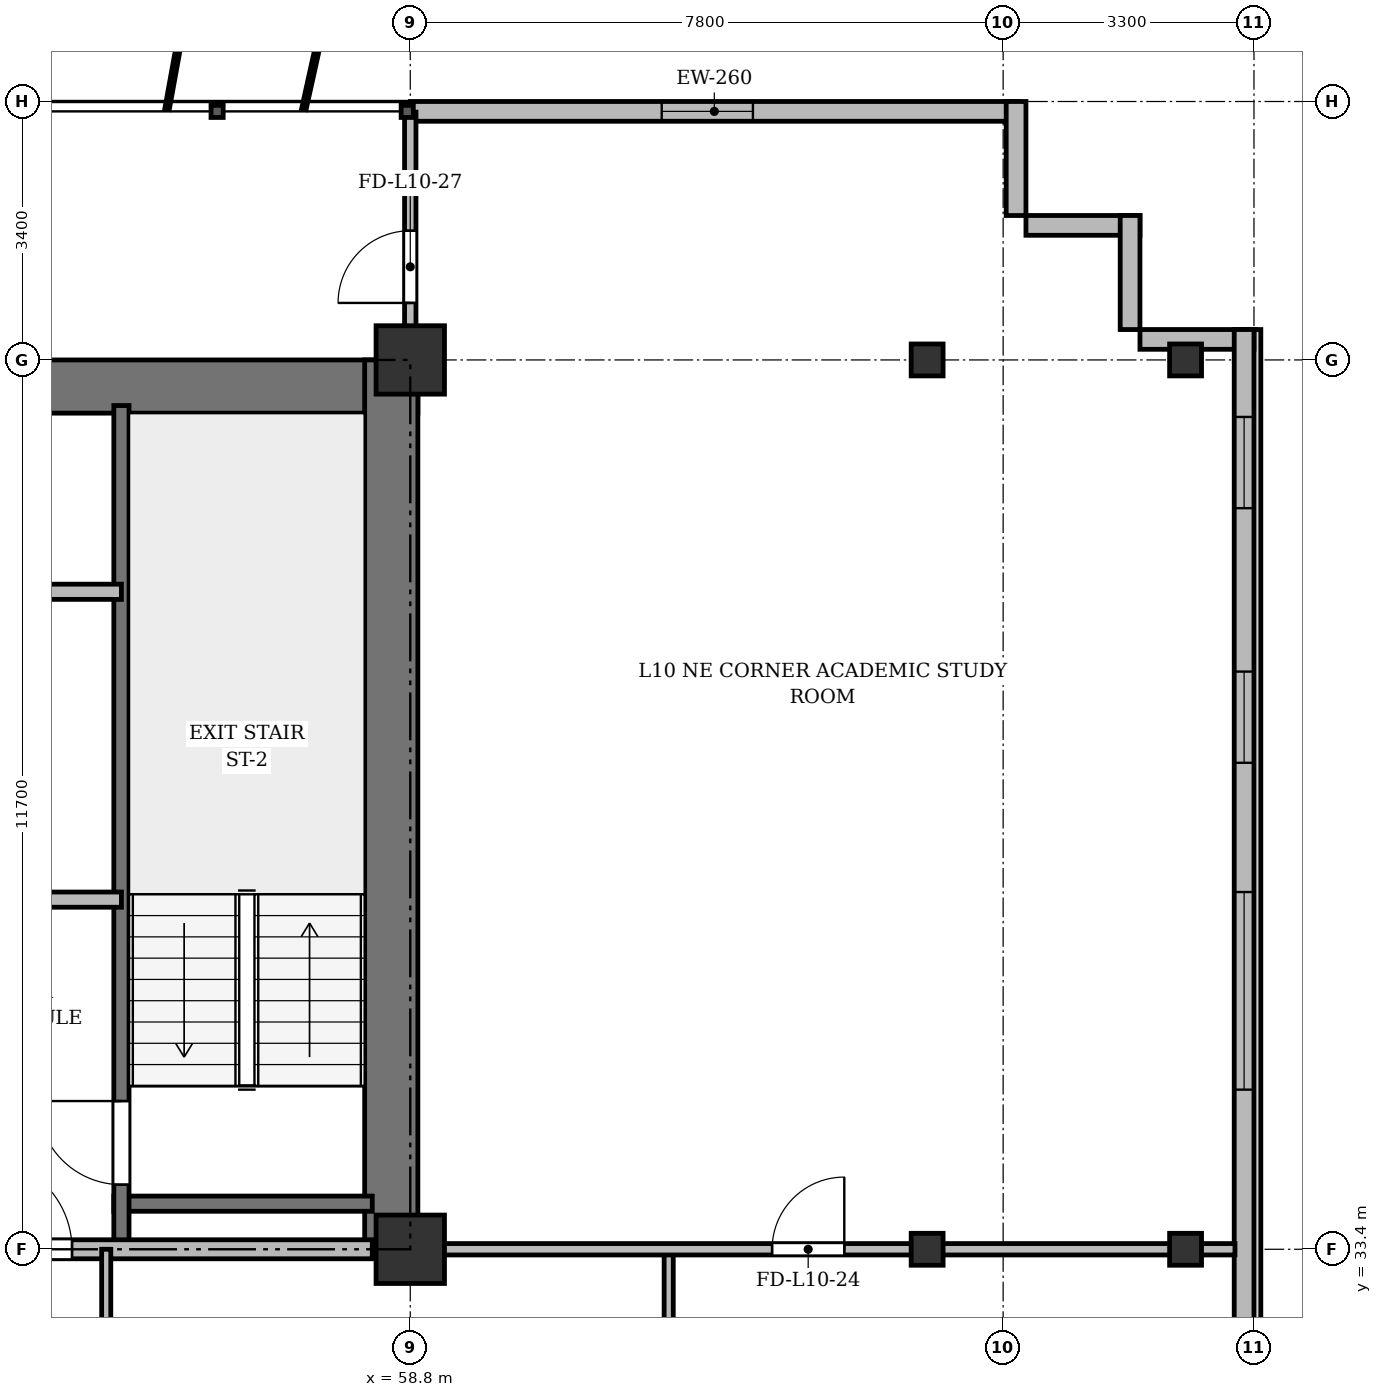
"""IFC4 building model, lengths in metres.
Left out: names, types, materials, properties, quantities, classifications, styles, units other than length and angle.
Written with IfcOpenShell. Run it as: python <this file> out.ifc"""

import sys

from ifc_helpers import new_model, si_unit, direction, frame, frame_2d, origin, origin_2d, place, context, subcontext, project, spatial, rectangle, i_section, extrude, source, transform, mapped, element, fill, save


model = new_model("IFC4")
c1 = context("Model", 3, precision=1e-05, world=origin(), true_north=direction((0.0, 1.0)))
c2 = subcontext(c1, "Body", "Model", "MODEL_VIEW")
j1 = project(units=[si_unit("LENGTHUNIT", "METRE"), si_unit("PLANEANGLEUNIT", "RADIAN")], contexts=[c1])
p1 = place(None, origin())
s1 = spatial("IfcSite", under=j1, at=p1, CompositionType="ELEMENT")
p2 = place(p1, origin())
s2 = spatial("IfcBuilding", under=s1, at=p2, CompositionType="ELEMENT")
p3 = place(p2, frame((0.0, 0.0, 41.5)))
s3 = spatial("IfcBuildingStorey", under=s2, at=p3, CompositionType="ELEMENT", Elevation=41.5)
m1 = source(origin(), c2, "Body", "SweptSolid", [
    extrude(rectangle(XDim=0.9, YDim=0.9, at=origin_2d()), origin(), (0.0, 0.0, 1.0), 3.6),
])
for number, where, z_axis, x_axis in (
    (1, (58.8, 33.4, 0.0), (0.0, 0.0, 1.0), (1.0, 0.0, 0.0)),
    (2, (58.8, 45.1, 0.0), (0.0, 0.0, 1.0), (1.0, 0.0, 0.0)),
):
    element("IfcColumn", number, at=place(p3, frame(where, z_axis=z_axis, x_axis=x_axis)), inside=s3, PredefinedType="COLUMN", context=c2, shape_type="MappedRepresentation", body=[
        mapped(m1, transform((0.0, 0.0, 0.0), x_axis=(1.0, 0.0, 0.0), y_axis=(0.0, 1.0, 0.0), z_axis=(0.0, 0.0, 1.0), scale=1.0)),
    ])
m2 = source(origin(), c2, "Body", "SweptSolid", [
    extrude(i_section(OverallWidth=0.42, OverallDepth=0.42, WebThickness=0.026, FlangeThickness=0.04, at=origin_2d()), origin(), (0.0, 0.0, 1.0), 3.6),
])
for number, where, z_axis, x_axis in (
    (3, (65.6, 33.4, 0.0), (0.0, 0.0, 1.0), (1.0, 0.0, 0.0)),
    (4, (65.6, 45.1, 0.0), (0.0, 0.0, 1.0), (1.0, 0.0, 0.0)),
    (5, (69.0, 33.4, 0.0), (0.0, 0.0, 1.0), (1.0, 0.0, 0.0)),
    (6, (69.0, 45.1, 0.0), (0.0, 0.0, 1.0), (1.0, 0.0, 0.0)),
):
    element("IfcColumn", number, at=place(p3, frame(where, z_axis=z_axis, x_axis=x_axis)), inside=s3, PredefinedType="COLUMN", context=c2, shape_type="MappedRepresentation", body=[
        mapped(m2, transform((0.0, 0.0, 0.0), x_axis=(1.0, 0.0, 0.0), y_axis=(0.0, 1.0, 0.0), z_axis=(0.0, 0.0, 1.0), scale=1.0)),
    ])
p4 = place(p3, frame((58.8, 48.37, 0.0), z_axis=(0.0, 0.0, 1.0), x_axis=(1.0, 0.0, 0.0)))
e7 = element("IfcWall", 7, at=p4, inside=s3, PredefinedType="SOLIDWALL", context=c2, shape_type="SweptSolid", body=[
    extrude(rectangle(XDim=8.0, YDim=0.26, at=frame_2d((4.0, 0.0))), origin(), (0.0, 0.0, 1.0), 3.34),
])
p5 = place(p4, frame((3.308, 0.0, 0.9)))
e8 = element("IfcOpeningElement", 8, at=p5, cuts=e7, PredefinedType="OPENING", context=c2, shape_type="SweptSolid", body=[
    extrude(rectangle(XDim=1.2, YDim=1.65, at=frame_2d((0.6, 0.825))), frame((0.0, 0.14, 0.0), z_axis=(0.0, -1.0, 0.0), x_axis=(1.0, 0.0, 0.0)), (0.0, 0.0, 1.0), 0.28),
])
for number, where, z_axis, x_axis in (
    (9, (66.77, 48.5, 0.0), (0.0, 0.0, 1.0), (0.0, -1.0, 0.0)),
    (10, (66.9, 46.87, 0.0), (0.0, 0.0, 1.0), (1.0, 0.0, 0.0)),
    (11, (68.27, 47.0, 0.0), (0.0, 0.0, 1.0), (0.0, -1.0, 0.0)),
):
    element("IfcWall", number, at=place(p3, frame(where, z_axis=z_axis, x_axis=x_axis)), inside=s3, PredefinedType="SOLIDWALL", context=c2, shape_type="SweptSolid", body=[
        extrude(rectangle(XDim=1.5, YDim=0.26, at=frame_2d((0.75, 0.0))), origin(), (0.0, 0.0, 1.0), 3.34),
    ])
p6 = place(p3, frame((68.4, 45.37, 0.0), z_axis=(0.0, 0.0, 1.0), x_axis=(1.0, 0.0, 0.0)))
e12 = element("IfcWall", 12, at=p6, inside=s3, PredefinedType="SOLIDWALL", context=c2, shape_type="SweptSolid", body=[
    extrude(rectangle(XDim=1.5, YDim=0.26, at=frame_2d((0.75, 0.0))), origin(), (0.0, 0.0, 1.0), 2.69),
])
p7 = place(p3, frame((69.77, 45.5, 0.0), z_axis=(0.0, 0.0, 1.0), x_axis=(0.0, -1.0, 0.0)))
e13 = element("IfcWall", 13, at=p7, inside=s3, PredefinedType="SOLIDWALL", context=c2, shape_type="SweptSolid", body=[
    extrude(rectangle(XDim=39.6, YDim=0.26, at=frame_2d((19.8, 0.0))), origin(), (0.0, 0.0, 1.0), 3.34),
])
p8 = place(p7, frame((36.95, 0.0, 0.92)))
e14 = element("IfcOpeningElement", 14, at=p8, cuts=e13, PredefinedType="OPENING", context=c2, shape_type="SweptSolid", body=[
    extrude(rectangle(XDim=1.2, YDim=1.65, at=frame_2d((0.6, 0.825))), frame((0.0, 0.14, 0.0), z_axis=(0.0, -1.0, 0.0), x_axis=(1.0, 0.0, 0.0)), (0.0, 0.0, 1.0), 0.28),
])
p9 = place(p7, frame((32.8, 0.0, 0.92)))
e15 = element("IfcOpeningElement", 15, at=p9, cuts=e13, PredefinedType="OPENING", context=c2, shape_type="SweptSolid", body=[
    extrude(rectangle(XDim=2.6, YDim=1.9, at=frame_2d((1.3, 0.95))), frame((0.0, 0.14, 0.0), z_axis=(0.0, -1.0, 0.0), x_axis=(1.0, 0.0, 0.0)), (0.0, 0.0, 1.0), 0.28),
])
p10 = place(p7, frame((28.6, 0.0, 0.92)))
e16 = element("IfcOpeningElement", 16, at=p10, cuts=e13, PredefinedType="OPENING", context=c2, shape_type="SweptSolid", body=[
    extrude(rectangle(XDim=2.6, YDim=1.9, at=frame_2d((1.3, 0.95))), frame((0.0, 0.14, 0.0), z_axis=(0.0, -1.0, 0.0), x_axis=(1.0, 0.0, 0.0)), (0.0, 0.0, 1.0), 0.28),
])
p11 = place(p7, frame((7.4, 0.0, 0.92)))
e17 = element("IfcOpeningElement", 17, at=p11, cuts=e13, PredefinedType="OPENING", context=c2, shape_type="SweptSolid", body=[
    extrude(rectangle(XDim=2.6, YDim=1.9, at=frame_2d((1.3, 0.95))), frame((0.0, 0.14, 0.0), z_axis=(0.0, -1.0, 0.0), x_axis=(1.0, 0.0, 0.0)), (0.0, 0.0, 1.0), 0.28),
])
p12 = place(p7, frame((4.5, 0.0, 0.92)))
e18 = element("IfcOpeningElement", 18, at=p12, cuts=e13, PredefinedType="OPENING", context=c2, shape_type="SweptSolid", body=[
    extrude(rectangle(XDim=1.2, YDim=1.65, at=frame_2d((0.6, 0.825))), frame((0.0, 0.14, 0.0), z_axis=(0.0, -1.0, 0.0), x_axis=(1.0, 0.0, 0.0)), (0.0, 0.0, 1.0), 0.28),
])
p13 = place(p7, frame((1.15, 0.0, 0.92)))
e19 = element("IfcOpeningElement", 19, at=p13, cuts=e13, PredefinedType="OPENING", context=c2, shape_type="SweptSolid", body=[
    extrude(rectangle(XDim=1.2, YDim=1.65, at=frame_2d((0.6, 0.825))), frame((0.0, 0.14, 0.0), z_axis=(0.0, -1.0, 0.0), x_axis=(1.0, 0.0, 0.0)), (0.0, 0.0, 1.0), 0.28),
])
p14 = place(p3, frame((15.5, 44.75, 0.0), z_axis=(0.0, 0.0, 1.0), x_axis=(1.0, 0.0, 0.0)))
e20 = element("IfcWall", 20, at=p14, inside=s3, PredefinedType="SHEAR", context=c2, shape_type="SweptSolid", body=[
    extrude(rectangle(XDim=43.4, YDim=0.7, at=frame_2d((21.7, 0.0))), origin(), (0.0, 0.0, 1.0), 3.34),
])
p15 = place(p3, frame((58.55, 33.4, 0.0), z_axis=(0.0, 0.0, 1.0), x_axis=(0.0, 1.0, 0.0)))
e21 = element("IfcWall", 21, at=p15, inside=s3, PredefinedType="SHEAR", context=c2, shape_type="SweptSolid", body=[
    extrude(rectangle(XDim=11.7, YDim=0.7, at=frame_2d((5.85, 0.0))), origin(), (0.0, 0.0, 1.0), 3.34),
])
p16 = place(p3, frame((54.9, 34.0, 0.0), z_axis=(0.0, 0.0, 1.0), x_axis=(1.0, 0.0, 0.0)))
e22 = element("IfcWall", 22, at=p16, inside=s3, PredefinedType="SHEAR", context=c2, shape_type="SweptSolid", body=[
    extrude(rectangle(XDim=3.4, YDim=0.2, at=frame_2d((1.7, 0.0))), origin(), (0.0, 0.0, 1.0), 3.34),
])
p17 = place(p3, frame((55.0, 33.4, 0.0), z_axis=(0.0, 0.0, 1.0), x_axis=(0.0, 1.0, 0.0)))
e23 = element("IfcWall", 23, at=p17, inside=s3, PredefinedType="SHEAR", context=c2, shape_type="SweptSolid", body=[
    extrude(rectangle(XDim=11.1, YDim=0.2, at=frame_2d((5.55, 0.0))), origin(), (0.0, 0.0, 1.0), 3.34),
])
p18 = place(p17, frame((0.85, 0.0, 0.0)))
e24 = element("IfcOpeningElement", 24, at=p18, cuts=e23, PredefinedType="OPENING", context=c2, shape_type="SweptSolid", body=[
    extrude(rectangle(XDim=1.1, YDim=2.15, at=frame_2d((0.55, 1.075))), frame((0.0, 0.11, 0.0), z_axis=(0.0, -1.0, 0.0), x_axis=(1.0, 0.0, 0.0)), (0.0, 0.0, 1.0), 0.22),
])
p19 = place(p3, frame((47.15, 42.05, 0.0), z_axis=(0.0, 0.0, 1.0), x_axis=(1.0, 0.0, 0.0)))
e25 = element("IfcWall", 25, at=p19, inside=s3, PredefinedType="SOLIDWALL", context=c2, shape_type="SweptSolid", body=[
    extrude(rectangle(XDim=7.85, YDim=0.2, at=frame_2d((3.925, 0.0))), origin(), (0.0, 0.0, 1.0), 2.752),
])
p20 = place(p19, frame((0.75, 0.0, 0.0)))
e26 = element("IfcOpeningElement", 26, at=p20, cuts=e25, PredefinedType="OPENING", context=c2, shape_type="SweptSolid", body=[
    extrude(rectangle(XDim=0.9, YDim=2.1, at=frame_2d((0.45, 1.05))), frame((0.0, 0.11, 0.0), z_axis=(0.0, -1.0, 0.0), x_axis=(1.0, 0.0, 0.0)), (0.0, 0.0, 1.0), 0.22),
])
p21 = place(p19, frame((3.85, 0.0, 0.0)))
e27 = element("IfcOpeningElement", 27, at=p21, cuts=e25, PredefinedType="OPENING", context=c2, shape_type="SweptSolid", body=[
    extrude(rectangle(XDim=0.9, YDim=2.1, at=frame_2d((0.45, 1.05))), frame((0.0, 0.11, 0.0), z_axis=(0.0, -1.0, 0.0), x_axis=(1.0, 0.0, 0.0)), (0.0, 0.0, 1.0), 0.22),
])
p22 = place(p3, frame((52.45, 38.0, 0.0), z_axis=(0.0, 0.0, 1.0), x_axis=(1.0, 0.0, 0.0)))
e28 = element("IfcWall", 28, at=p22, inside=s3, PredefinedType="PARTITIONING", context=c2, shape_type="SweptSolid", body=[
    extrude(rectangle(XDim=2.55, YDim=0.2, at=frame_2d((1.275, 0.0))), origin(), (0.0, 0.0, 1.0), 3.34),
])
p23 = place(p3, frame((47.15, 33.4, 0.0), z_axis=(0.0, 0.0, 1.0), x_axis=(1.0, 0.0, 0.0)))
e29 = element("IfcWall", 29, at=p23, inside=s3, PredefinedType="PARTITIONING", context=c2, shape_type="SweptSolid", body=[
    extrude(rectangle(XDim=11.15, YDim=0.25, at=frame_2d((5.575, 0.0))), origin(), (0.0, 0.0, 1.0), 2.69),
])
p24 = place(p23, frame((0.7, 0.0, 0.0)))
e30 = element("IfcOpeningElement", 30, at=p24, cuts=e29, PredefinedType="OPENING", context=c2, shape_type="SweptSolid", body=[
    extrude(rectangle(XDim=0.95, YDim=2.15, at=frame_2d((0.475, 1.075))), frame((0.0, 0.135, 0.0), z_axis=(0.0, -1.0, 0.0), x_axis=(1.0, 0.0, 0.0)), (0.0, 0.0, 1.0), 0.27),
])
p25 = place(p23, frame((6.0, 0.0, 0.0)))
e31 = element("IfcOpeningElement", 31, at=p25, cuts=e29, PredefinedType="OPENING", context=c2, shape_type="SweptSolid", body=[
    extrude(rectangle(XDim=1.2, YDim=2.15, at=frame_2d((0.6, 1.075))), frame((0.0, 0.135, 0.0), z_axis=(0.0, -1.0, 0.0), x_axis=(1.0, 0.0, 0.0)), (0.0, 0.0, 1.0), 0.27),
])
for number, where, z_axis, x_axis in (
    (32, (62.2, 29.8, 0.0), (0.0, 0.0, 1.0), (0.0, 1.0, 0.0)),
    (33, (54.8, 29.8, 0.0), (0.0, 0.0, 1.0), (0.0, 1.0, 0.0)),
):
    element("IfcWall", number, at=place(p3, frame(where, z_axis=z_axis, x_axis=x_axis)), inside=s3, PredefinedType="PARTITIONING", context=c2, shape_type="SweptSolid", body=[
        extrude(rectangle(XDim=3.6, YDim=0.12, at=frame_2d((1.8, 0.0))), origin(), (0.0, 0.0, 1.0), 2.69),
    ])
p26 = place(p3, frame((58.8, 33.4, 0.0), z_axis=(0.0, 0.0, 1.0), x_axis=(1.0, 0.0, 0.0)))
e34 = element("IfcWall", 34, at=p26, inside=s3, PredefinedType="PARTITIONING", context=c2, shape_type="SweptSolid", body=[
    extrude(rectangle(XDim=10.85, YDim=0.15, at=frame_2d((5.425, 0.0))), origin(), (0.0, 0.0, 1.0), 2.69),
])
p27 = place(p26, frame((4.76, 0.0, 0.0)))
e35 = element("IfcOpeningElement", 35, at=p27, cuts=e34, PredefinedType="OPENING", context=c2, shape_type="SweptSolid", body=[
    extrude(rectangle(XDim=0.95, YDim=2.15, at=frame_2d((0.475, 1.075))), frame((0.0, 0.085, 0.0), z_axis=(0.0, -1.0, 0.0), x_axis=(1.0, 0.0, 0.0)), (0.0, 0.0, 1.0), 0.17),
])
p28 = place(p3, frame((58.8, 44.75, 0.0), z_axis=(0.0, 0.0, 1.0), x_axis=(0.0, 1.0, 0.0)))
e36 = element("IfcWall", 36, at=p28, inside=s3, PredefinedType="PARTITIONING", context=c2, shape_type="SweptSolid", body=[
    extrude(rectangle(XDim=3.61, YDim=0.15, at=frame_2d((1.805, 0.0))), origin(), (0.0, 0.0, 1.0), 2.752),
])
p29 = place(p28, frame((1.1, 0.0, 0.0)))
e37 = element("IfcOpeningElement", 37, at=p29, cuts=e36, PredefinedType="OPENING", context=c2, shape_type="SweptSolid", body=[
    extrude(rectangle(XDim=0.95, YDim=2.15, at=frame_2d((0.475, 1.075))), frame((0.0, 0.085, 0.0), z_axis=(0.0, -1.0, 0.0), x_axis=(1.0, 0.0, 0.0)), (0.0, 0.0, 1.0), 0.17),
])
m3 = source(origin(), c2, "Body", "SweptSolid", [
    extrude(rectangle(XDim=1.2, YDim=1.65, at=frame_2d((0.6, 0.825))), frame((0.0, 0.03, 0.0), z_axis=(0.0, -1.0, 0.0), x_axis=(1.0, 0.0, 0.0)), (0.0, 0.0, 1.0), 0.06),
])
p30 = place(p5, origin())
e38 = element("IfcWindow", 38, at=p30, inside=s3, PartitioningType="SINGLE_PANEL", PredefinedType="WINDOW", context=c2, shape_type="MappedRepresentation", body=[
    mapped(m3, transform((0.0, 0.0, 0.0), x_axis=(1.0, 0.0, 0.0), y_axis=(0.0, 1.0, 0.0), z_axis=(0.0, 0.0, 1.0), scale=1.0)),
])
fill(e8, e38)
m4 = source(origin(), c2, "Body", "SweptSolid", [
    extrude(rectangle(XDim=2.6, YDim=1.9, at=frame_2d((1.3, 0.95))), frame((0.0, 0.03, 0.0), z_axis=(0.0, -1.0, 0.0), x_axis=(1.0, 0.0, 0.0)), (0.0, 0.0, 1.0), 0.06),
])
p31 = place(p11, origin())
e39 = element("IfcWindow", 39, at=p31, inside=s3, PartitioningType="SINGLE_PANEL", PredefinedType="WINDOW", context=c2, shape_type="MappedRepresentation", body=[
    mapped(m4, transform((0.0, 0.0, 0.0), x_axis=(1.0, 0.0, 0.0), y_axis=(0.0, 1.0, 0.0), z_axis=(0.0, 0.0, 1.0), scale=1.0)),
])
fill(e17, e39)
p32 = place(p12, origin())
e40 = element("IfcWindow", 40, at=p32, inside=s3, PartitioningType="SINGLE_PANEL", PredefinedType="WINDOW", context=c2, shape_type="MappedRepresentation", body=[
    mapped(m3, transform((0.0, 0.0, 0.0), x_axis=(1.0, 0.0, 0.0), y_axis=(0.0, 1.0, 0.0), z_axis=(0.0, 0.0, 1.0), scale=1.0)),
])
fill(e18, e40)
p33 = place(p13, origin())
e41 = element("IfcWindow", 41, at=p33, inside=s3, PartitioningType="SINGLE_PANEL", PredefinedType="WINDOW", context=c2, shape_type="MappedRepresentation", body=[
    mapped(m3, transform((0.0, 0.0, 0.0), x_axis=(1.0, 0.0, 0.0), y_axis=(0.0, 1.0, 0.0), z_axis=(0.0, 0.0, 1.0), scale=1.0)),
])
fill(e19, e41)
m5 = source(origin(), c2, "Body", "SweptSolid", [
    extrude(rectangle(XDim=1.1, YDim=2.15, at=frame_2d((0.55, 1.075))), frame((0.0, 0.025, 0.0), z_axis=(0.0, -1.0, 0.0), x_axis=(1.0, 0.0, 0.0)), (0.0, 0.0, 1.0), 0.05),
])
p34 = place(p18, origin())
e42 = element("IfcDoor", 42, at=p34, inside=s3, OperationType="SINGLE_SWING_RIGHT", PredefinedType="DOOR", context=c2, shape_type="MappedRepresentation", body=[
    mapped(m5, transform((0.0, 0.0, 0.0), x_axis=(1.0, 0.0, 0.0), y_axis=(0.0, 1.0, 0.0), z_axis=(0.0, 0.0, 1.0), scale=1.0)),
])
fill(e24, e42)
m6 = source(origin(), c2, "Body", "SweptSolid", [
    extrude(rectangle(XDim=1.2, YDim=2.15, at=frame_2d((0.6, 1.075))), frame((0.0, 0.025, 0.0), z_axis=(0.0, -1.0, 0.0), x_axis=(1.0, 0.0, 0.0)), (0.0, 0.0, 1.0), 0.05),
])
p35 = place(p25, origin())
e43 = element("IfcDoor", 43, at=p35, inside=s3, OperationType="SINGLE_SWING_LEFT", PredefinedType="DOOR", context=c2, shape_type="MappedRepresentation", body=[
    mapped(m6, transform((0.0, 0.0, 0.0), x_axis=(1.0, 0.0, 0.0), y_axis=(0.0, 1.0, 0.0), z_axis=(0.0, 0.0, 1.0), scale=1.0)),
])
fill(e31, e43)
m7 = source(origin(), c2, "Body", "SweptSolid", [
    extrude(rectangle(XDim=0.95, YDim=2.15, at=frame_2d((0.475, 1.075))), frame((0.0, 0.025, 0.0), z_axis=(0.0, -1.0, 0.0), x_axis=(1.0, 0.0, 0.0)), (0.0, 0.0, 1.0), 0.05),
])
p36 = place(p27, origin())
e44 = element("IfcDoor", 44, at=p36, inside=s3, OperationType="SINGLE_SWING_RIGHT", PredefinedType="DOOR", context=c2, shape_type="MappedRepresentation", body=[
    mapped(m7, transform((0.0, 0.0, 0.0), x_axis=(1.0, 0.0, 0.0), y_axis=(0.0, 1.0, 0.0), z_axis=(0.0, 0.0, 1.0), scale=1.0)),
])
fill(e35, e44)
p37 = place(p29, origin())
e45 = element("IfcDoor", 45, at=p37, inside=s3, OperationType="SINGLE_SWING_LEFT", PredefinedType="DOOR", context=c2, shape_type="MappedRepresentation", body=[
    mapped(m7, transform((0.0, 0.0, 0.0), x_axis=(1.0, 0.0, 0.0), y_axis=(0.0, 1.0, 0.0), z_axis=(0.0, 0.0, 1.0), scale=1.0)),
])
fill(e37, e45)
save(model, sys.argv[1])
